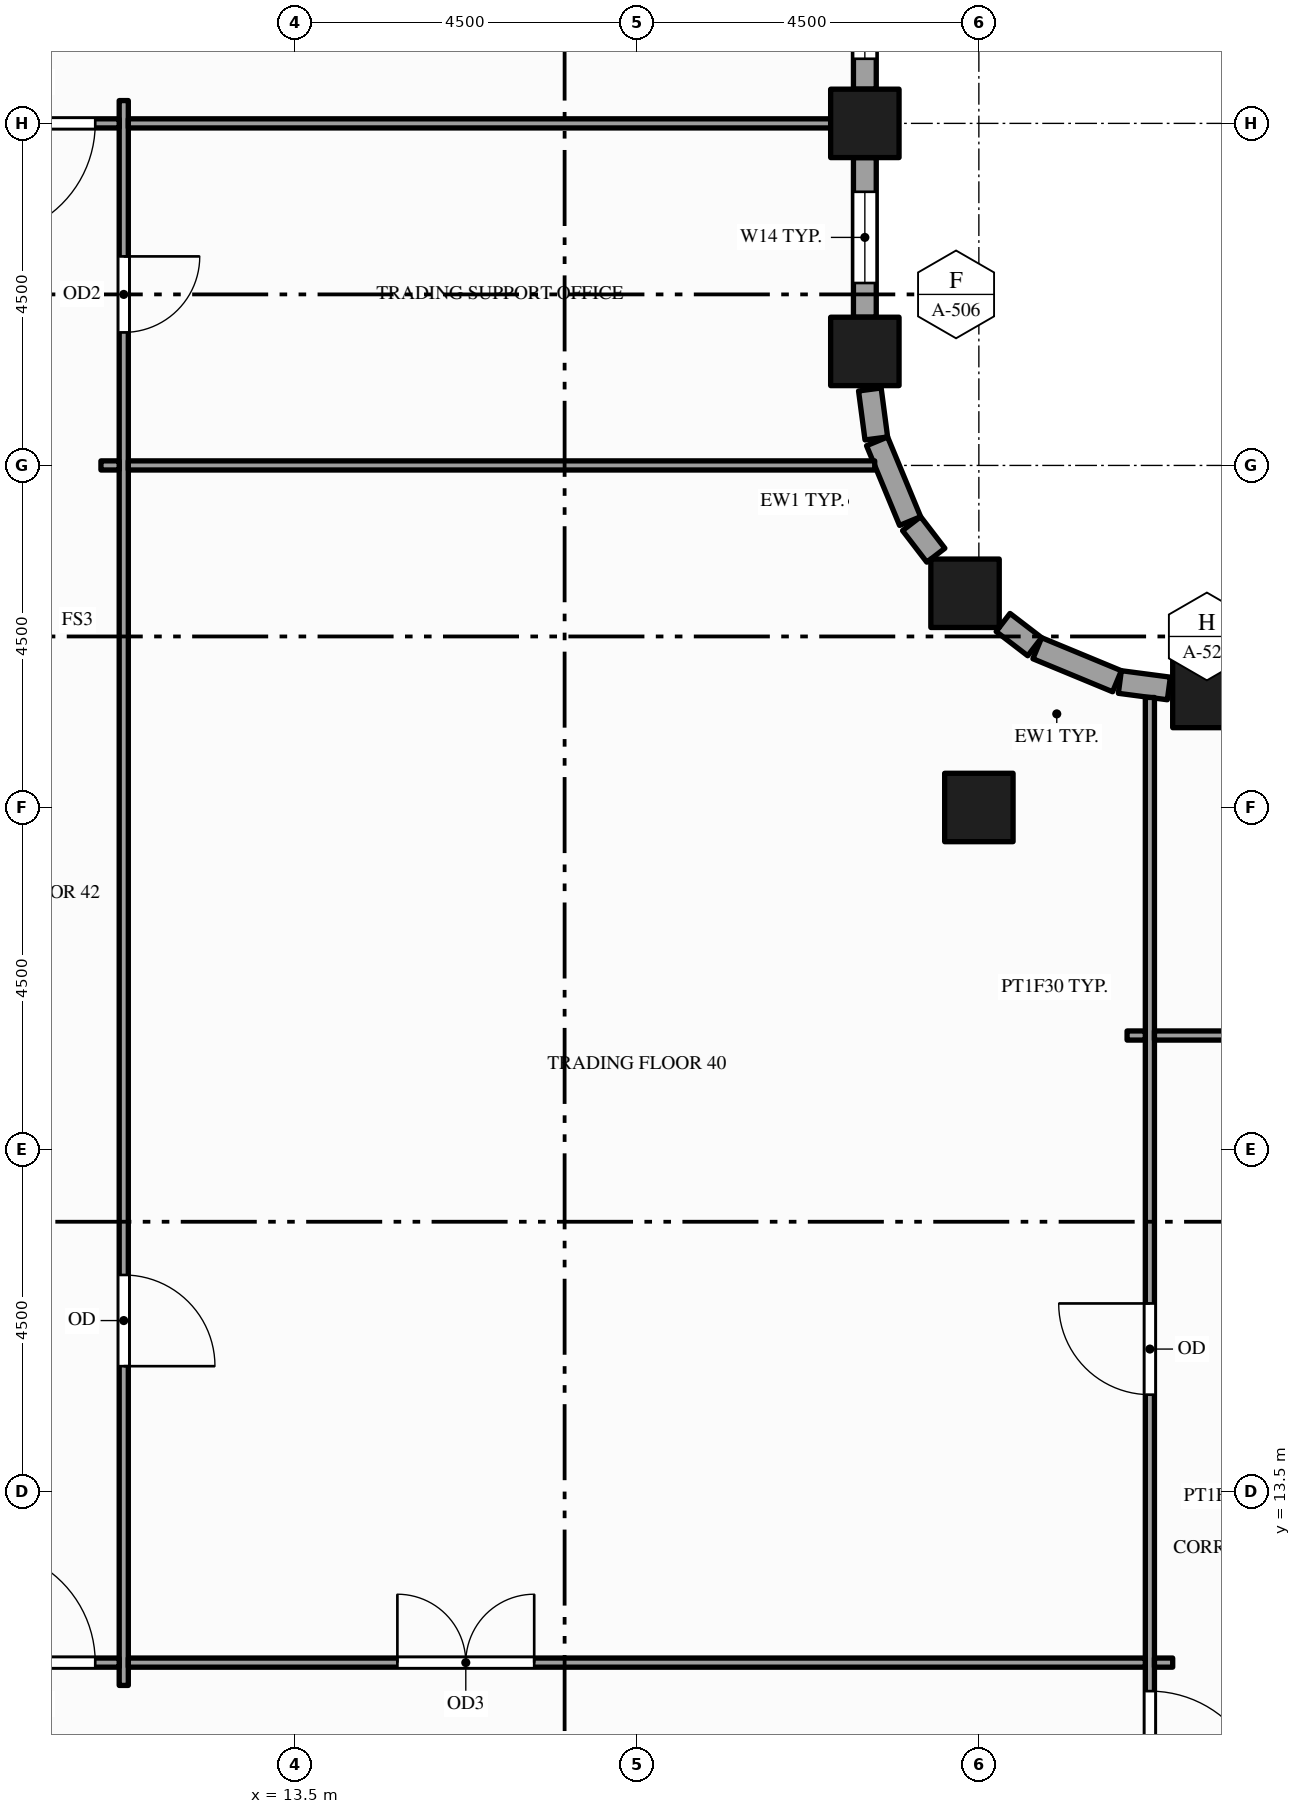
"""IFC4 building model, lengths in metres.
Left out: names, types, materials, properties, quantities, classifications, styles, units other than length and angle.
Written with IfcOpenShell. Run it as: python <this file> out.ifc"""

import sys

from ifc_helpers import new_model, si_unit, direction, frame, frame_2d, origin, origin_2d, place, context, subcontext, project, spatial, rectangle, hollow_rectangle, extrude, element, fill, save


model = new_model("IFC4")
c1 = context("Model", 3, precision=1e-05, world=origin(), true_north=direction((0.0, 1.0)))
c2 = subcontext(c1, "Body", "Model", "MODEL_VIEW")
j1 = project(units=[si_unit("LENGTHUNIT", "METRE"), si_unit("PLANEANGLEUNIT", "RADIAN")], contexts=[c1])
p1 = place(None, origin())
s1 = spatial("IfcSite", under=j1, at=p1, CompositionType="ELEMENT")
p2 = place(p1, origin())
s2 = spatial("IfcBuilding", under=s1, at=p2, CompositionType="ELEMENT")
p3 = place(p2, frame((0.0, 0.0, 159.0)))
s3 = spatial("IfcBuildingStorey", under=s2, at=p3, CompositionType="ELEMENT", Elevation=159.0)
for number, where, z_axis, x_axis in (
    (1, (21.0, 28.5, -0.15), (0.0, 0.0, 1.0), (1.0, 0.0, 0.0)),
    (2, (21.0, 31.5, -0.15), (0.0, 0.0, 1.0), (1.0, 0.0, 0.0)),
    (3, (22.318, 25.318, -0.15), (0.0, 0.0, 1.0), (1.0, 0.0, 0.0)),
    (4, (22.5, 22.5, -0.15), (0.0, 0.0, 1.0), (1.0, 0.0, 0.0)),
    (5, (25.5, 24.0, -0.15), (0.0, 0.0, 1.0), (1.0, 0.0, 0.0)),
):
    element("IfcColumn", number, at=place(p3, frame(where, z_axis=z_axis, x_axis=x_axis)), inside=s3, PredefinedType="COLUMN", context=c2, shape_type="SweptSolid", body=[
        extrude(hollow_rectangle(XDim=0.9, YDim=0.9, WallThickness=0.045, at=origin_2d()), origin(), (0.0, 0.0, 1.0), 4.0),
    ])
p4 = place(p3, frame((25.0, 24.066, 0.0), z_axis=(0.0, 0.0, 1.0), x_axis=(-0.991423590996, 0.130687655177, 0.0)))
e6 = element("IfcWall", 6, at=p4, inside=s3, PredefinedType="STANDARD", context=c2, shape_type="SweptSolid", body=[
    extrude(rectangle(XDim=0.65, YDim=0.3, at=frame_2d((0.325, 0.0))), origin(), (0.0, 0.0, 1.0), 2.87),
])
p5 = place(p3, frame((24.317, 24.161, 0.0), z_axis=(0.0, 0.0, 1.0), x_axis=(-0.923914616768, 0.382598720491, 0.0)))
e7 = element("IfcWall", 7, at=p5, inside=s3, PredefinedType="STANDARD", context=c2, shape_type="SweptSolid", body=[
    extrude(rectangle(XDim=1.135, YDim=0.3, at=frame_2d((0.568, 0.0))), origin(), (0.0, 0.0, 1.0), 3.149),
])
for number, where, z_axis, x_axis in (
    (8, (23.234, 24.615, 0.0), (0.0, 0.0, 1.0), (-0.794, 0.609, 0.0)),
    (9, (21.934, 25.819, 0.0), (0.0, 0.0, 1.0), (-0.609, 0.794, 0.0)),
):
    element("IfcWall", number, at=place(p3, frame(where, z_axis=z_axis, x_axis=x_axis)), inside=s3, PredefinedType="STANDARD", context=c2, shape_type="SweptSolid", body=[
        extrude(rectangle(XDim=0.524, YDim=0.3, at=frame_2d((0.262, 0.0))), origin(), (0.0, 0.0, 1.0), 3.149),
    ])
p6 = place(p3, frame((21.595, 26.268, 0.0), z_axis=(0.0, 0.0, 1.0), x_axis=(-0.382598720491, 0.923914616768, 0.0)))
e10 = element("IfcWall", 10, at=p6, inside=s3, PredefinedType="STANDARD", context=c2, shape_type="SweptSolid", body=[
    extrude(rectangle(XDim=1.135, YDim=0.3, at=frame_2d((0.568, 0.0))), origin(), (0.0, 0.0, 1.0), 3.149),
])
p7 = place(p3, frame((21.151, 27.355, 0.0), z_axis=(0.0, 0.0, 1.0), x_axis=(-0.130687655177, 0.991423590996, 0.0)))
e11 = element("IfcWall", 11, at=p7, inside=s3, PredefinedType="STANDARD", context=c2, shape_type="SweptSolid", body=[
    extrude(rectangle(XDim=0.65, YDim=0.3, at=frame_2d((0.325, 0.0))), origin(), (0.0, 0.0, 1.0), 3.149),
])
p8 = place(p3, frame((21.0, 28.95, 0.0), z_axis=(0.0, 0.0, 1.0), x_axis=(0.0, 1.0, 0.0)))
e12 = element("IfcWall", 12, at=p8, inside=s3, PredefinedType="STANDARD", context=c2, shape_type="SweptSolid", body=[
    extrude(rectangle(XDim=2.1, YDim=0.3, at=frame_2d((1.05, 0.0))), origin(), (0.0, 0.0, 1.0), 3.149),
])
p9 = place(p8, frame((0.45, 0.0, 0.9)))
e13 = element("IfcOpeningElement", 13, at=p9, cuts=e12, PredefinedType="OPENING", context=c2, shape_type="SweptSolid", body=[
    extrude(rectangle(XDim=1.2, YDim=2.0, at=frame_2d((0.6, 1.0))), frame((0.0, 0.16, 0.0), z_axis=(0.0, -1.0, 0.0), x_axis=(1.0, 0.0, 0.0)), (0.0, 0.0, 1.0), 0.32),
])
p10 = place(p3, frame((21.0, 31.95, 0.0), z_axis=(0.0, 0.0, 1.0), x_axis=(0.0, 1.0, 0.0)))
e14 = element("IfcWall", 14, at=p10, inside=s3, PredefinedType="STANDARD", context=c2, shape_type="SweptSolid", body=[
    extrude(rectangle(XDim=4.05, YDim=0.3, at=frame_2d((2.025, 0.0))), origin(), (0.0, 0.0, 1.0), 3.149),
])
p11 = place(p10, frame((0.4, 0.0, 0.9)))
e15 = element("IfcOpeningElement", 15, at=p11, cuts=e14, PredefinedType="OPENING", context=c2, shape_type="SweptSolid", body=[
    extrude(rectangle(XDim=1.1, YDim=2.0, at=frame_2d((0.55, 1.0))), frame((0.0, 0.16, 0.0), z_axis=(0.0, -1.0, 0.0), x_axis=(1.0, 0.0, 0.0)), (0.0, 0.0, 1.0), 0.32),
])
p12 = place(p10, frame((2.1, 0.0, 0.9)))
e16 = element("IfcOpeningElement", 16, at=p12, cuts=e14, PredefinedType="OPENING", context=c2, shape_type="SweptSolid", body=[
    extrude(rectangle(XDim=1.55, YDim=2.0, at=frame_2d((0.775, 1.0))), frame((0.0, 0.16, 0.0), z_axis=(0.0, -1.0, 0.0), x_axis=(1.0, 0.0, 0.0)), (0.0, 0.0, 1.0), 0.32),
])
p13 = place(p3, frame((11.25, 10.95, 0.0), z_axis=(0.0, 0.0, 1.0), x_axis=(0.0, 1.0, 0.0)))
e17 = element("IfcWall", 17, at=p13, inside=s3, PredefinedType="PARTITIONING", context=c2, shape_type="SweptSolid", body=[
    extrude(rectangle(XDim=20.85, YDim=0.12, at=frame_2d((10.425, 0.0))), origin(), (0.0, 0.0, 1.0), 2.6),
])
p14 = place(p13, frame((17.8, 0.0, 0.0)))
e18 = element("IfcOpeningElement", 18, at=p14, cuts=e17, PredefinedType="OPENING", context=c2, shape_type="SweptSolid", body=[
    extrude(rectangle(XDim=1.0, YDim=2.1, at=frame_2d((0.5, 1.05))), frame((0.0, 0.07, 0.0), z_axis=(0.0, -1.0, 0.0), x_axis=(1.0, 0.0, 0.0)), (0.0, 0.0, 1.0), 0.14),
])
p15 = place(p13, frame((4.2, 0.0, 0.0)))
e19 = element("IfcOpeningElement", 19, at=p15, cuts=e17, PredefinedType="OPENING", context=c2, shape_type="SweptSolid", body=[
    extrude(rectangle(XDim=1.2, YDim=2.1, at=frame_2d((0.6, 1.05))), frame((0.0, 0.07, 0.0), z_axis=(0.0, -1.0, 0.0), x_axis=(1.0, 0.0, 0.0)), (0.0, 0.0, 1.0), 0.14),
])
p16 = place(p3, frame((24.75, 1.65, 0.0), z_axis=(0.0, 0.0, 1.0), x_axis=(0.0, 1.0, 0.0)))
e20 = element("IfcWall", 20, at=p16, inside=s3, PredefinedType="PARTITIONING", context=c2, shape_type="SweptSolid", body=[
    extrude(rectangle(XDim=22.298, YDim=0.12, at=frame_2d((11.149, 0.0))), origin(), (0.0, 0.0, 1.0), 2.87),
])
p17 = place(p16, frame((7.725, 0.0, 0.0)))
e21 = element("IfcOpeningElement", 21, at=p17, cuts=e20, PredefinedType="OPENING", context=c2, shape_type="SweptSolid", body=[
    extrude(rectangle(XDim=1.5, YDim=2.1, at=frame_2d((0.75, 1.05))), frame((0.0, 0.07, 0.0), z_axis=(0.0, -1.0, 0.0), x_axis=(1.0, 0.0, 0.0)), (0.0, 0.0, 1.0), 0.14),
])
p18 = place(p16, frame((13.125, 0.0, 0.0)))
e22 = element("IfcOpeningElement", 22, at=p18, cuts=e20, PredefinedType="OPENING", context=c2, shape_type="SweptSolid", body=[
    extrude(rectangle(XDim=1.2, YDim=2.1, at=frame_2d((0.6, 1.05))), frame((0.0, 0.07, 0.0), z_axis=(0.0, -1.0, 0.0), x_axis=(1.0, 0.0, 0.0)), (0.0, 0.0, 1.0), 0.14),
])
p19 = place(p3, frame((9.06, 11.25, 0.0), z_axis=(0.0, 0.0, 1.0), x_axis=(1.0, 0.0, 0.0)))
e23 = element("IfcWall", 23, at=p19, inside=s3, PredefinedType="PARTITIONING", context=c2, shape_type="SweptSolid", body=[
    extrude(rectangle(XDim=2.13, YDim=0.12, at=frame_2d((1.065, 0.0))), origin(), (0.0, 0.0, 1.0), 2.87),
])
p20 = place(p19, frame((0.315, 0.0, 0.0)))
e24 = element("IfcOpeningElement", 24, at=p20, cuts=e23, PredefinedType="OPENING", context=c2, shape_type="SweptSolid", body=[
    extrude(rectangle(XDim=1.5, YDim=2.1, at=frame_2d((0.75, 1.05))), frame((0.0, 0.07, 0.0), z_axis=(0.0, -1.0, 0.0), x_axis=(1.0, 0.0, 0.0)), (0.0, 0.0, 1.0), 0.14),
])
p21 = place(p3, frame((11.31, 11.25, 0.0), z_axis=(0.0, 0.0, 1.0), x_axis=(1.0, 0.0, 0.0)))
e25 = element("IfcWall", 25, at=p21, inside=s3, PredefinedType="PARTITIONING", context=c2, shape_type="SweptSolid", body=[
    extrude(rectangle(XDim=13.38, YDim=0.12, at=frame_2d((6.69, 0.0))), origin(), (0.0, 0.0, 1.0), 2.87),
])
p22 = place(p21, frame((3.54, 0.0, 0.0)))
e26 = element("IfcOpeningElement", 26, at=p22, cuts=e25, PredefinedType="OPENING", context=c2, shape_type="SweptSolid", body=[
    extrude(rectangle(XDim=1.8, YDim=2.1, at=frame_2d((0.9, 1.05))), frame((0.0, 0.07, 0.0), z_axis=(0.0, -1.0, 0.0), x_axis=(1.0, 0.0, 0.0)), (0.0, 0.0, 1.0), 0.14),
])
for number, where, z_axis, x_axis in (
    (27, (24.81, 11.25, 0.0), (0.0, 0.0, 1.0), (1.0, 0.0, 0.0)),
    (28, (24.45, 19.5, 0.0), (0.0, 0.0, 1.0), (1.0, 0.0, 0.0)),
):
    element("IfcWall", number, at=place(p3, frame(where, z_axis=z_axis, x_axis=x_axis)), inside=s3, PredefinedType="PARTITIONING", context=c2, shape_type="SweptSolid", body=[
        extrude(rectangle(XDim=0.24, YDim=0.12, at=frame_2d((0.12, 0.0))), origin(), (0.0, 0.0, 1.0), 2.87),
    ])
p23 = place(p3, frame((24.81, 19.5, 0.0), z_axis=(0.0, 0.0, 1.0), x_axis=(1.0, 0.0, 0.0)))
e29 = element("IfcWall", 29, at=p23, inside=s3, PredefinedType="PARTITIONING", context=c2, shape_type="SweptSolid", body=[
    extrude(rectangle(XDim=2.13, YDim=0.12, at=frame_2d((1.065, 0.0))), origin(), (0.0, 0.0, 1.0), 2.87),
])
p24 = place(p3, frame((10.95, 27.0, 0.0), z_axis=(0.0, 0.0, 1.0), x_axis=(1.0, 0.0, 0.0)))
e30 = element("IfcWall", 30, at=p24, inside=s3, PredefinedType="PARTITIONING", context=c2, shape_type="SweptSolid", body=[
    extrude(rectangle(XDim=0.24, YDim=0.12, at=frame_2d((0.12, 0.0))), origin(), (0.0, 0.0, 1.0), 2.87),
])
p25 = place(p3, frame((11.31, 27.0, 0.0), z_axis=(0.0, 0.0, 1.0), x_axis=(1.0, 0.0, 0.0)))
e31 = element("IfcWall", 31, at=p25, inside=s3, PredefinedType="PARTITIONING", context=c2, shape_type="SweptSolid", body=[
    extrude(rectangle(XDim=9.82, YDim=0.12, at=frame_2d((4.91, 0.0))), origin(), (0.0, 0.0, 1.0), 2.87),
])
p26 = place(p3, frame((9.06, 31.5, 0.0), z_axis=(0.0, 0.0, 1.0), x_axis=(1.0, 0.0, 0.0)))
e32 = element("IfcWall", 32, at=p26, inside=s3, PredefinedType="PARTITIONING", context=c2, shape_type="SweptSolid", body=[
    extrude(rectangle(XDim=2.13, YDim=0.12, at=frame_2d((1.065, 0.0))), origin(), (0.0, 0.0, 1.0), 2.87),
])
p27 = place(p26, frame((0.315, 0.0, 0.0)))
e33 = element("IfcOpeningElement", 33, at=p27, cuts=e32, PredefinedType="OPENING", context=c2, shape_type="SweptSolid", body=[
    extrude(rectangle(XDim=1.5, YDim=2.1, at=frame_2d((0.75, 1.05))), frame((0.0, 0.07, 0.0), z_axis=(0.0, -1.0, 0.0), x_axis=(1.0, 0.0, 0.0)), (0.0, 0.0, 1.0), 0.14),
])
p28 = place(p3, frame((11.31, 31.5, 0.0), z_axis=(0.0, 0.0, 1.0), x_axis=(1.0, 0.0, 0.0)))
e34 = element("IfcWall", 34, at=p28, inside=s3, PredefinedType="PARTITIONING", context=c2, shape_type="SweptSolid", body=[
    extrude(rectangle(XDim=9.54, YDim=0.12, at=frame_2d((4.77, 0.0))), origin(), (0.0, 0.0, 1.0), 2.87),
])
p29 = place(p9, origin())
e35 = element("IfcWindow", 35, at=p29, inside=s3, PartitioningType="SINGLE_PANEL", PredefinedType="WINDOW", context=c2, shape_type="SweptSolid", body=[
    extrude(rectangle(XDim=1.2, YDim=2.0, at=frame_2d((0.6, 1.0))), frame((0.0, 0.03, 0.0), z_axis=(0.0, -1.0, 0.0), x_axis=(1.0, 0.0, 0.0)), (0.0, 0.0, 1.0), 0.06),
])
fill(e13, e35)
p30 = place(p11, origin())
e36 = element("IfcWindow", 36, at=p30, inside=s3, PartitioningType="SINGLE_PANEL", PredefinedType="WINDOW", context=c2, shape_type="SweptSolid", body=[
    extrude(rectangle(XDim=1.1, YDim=2.0, at=frame_2d((0.55, 1.0))), frame((0.0, 0.03, 0.0), z_axis=(0.0, -1.0, 0.0), x_axis=(1.0, 0.0, 0.0)), (0.0, 0.0, 1.0), 0.06),
])
fill(e15, e36)
p31 = place(p17, origin())
e37 = element("IfcDoor", 37, at=p31, inside=s3, OperationType="SINGLE_SWING_LEFT", PredefinedType="DOOR", context=c2, shape_type="SweptSolid", body=[
    extrude(rectangle(XDim=1.5, YDim=2.1, at=frame_2d((0.75, 1.05))), frame((0.0, 0.025, 0.0), z_axis=(0.0, -1.0, 0.0), x_axis=(1.0, 0.0, 0.0)), (0.0, 0.0, 1.0), 0.05),
])
fill(e21, e37)
p32 = place(p22, origin())
e38 = element("IfcDoor", 38, at=p32, inside=s3, OperationType="DOUBLE_DOOR_SINGLE_SWING", PredefinedType="DOOR", context=c2, shape_type="SweptSolid", body=[
    extrude(rectangle(XDim=1.8, YDim=2.1, at=frame_2d((0.9, 1.05))), frame((0.0, 0.025, 0.0), z_axis=(0.0, -1.0, 0.0), x_axis=(1.0, 0.0, 0.0)), (0.0, 0.0, 1.0), 0.05),
])
fill(e26, e38)
p33 = place(p20, origin())
e39 = element("IfcDoor", 39, at=p33, inside=s3, OperationType="SINGLE_SWING_LEFT", PredefinedType="DOOR", context=c2, shape_type="SweptSolid", body=[
    extrude(rectangle(XDim=1.5, YDim=2.1, at=frame_2d((0.75, 1.05))), frame((0.0, 0.025, 0.0), z_axis=(0.0, -1.0, 0.0), x_axis=(1.0, 0.0, 0.0)), (0.0, 0.0, 1.0), 0.05),
])
fill(e24, e39)
p34 = place(p27, origin())
e40 = element("IfcDoor", 40, at=p34, inside=s3, OperationType="SINGLE_SWING_LEFT", PredefinedType="DOOR", context=c2, shape_type="SweptSolid", body=[
    extrude(rectangle(XDim=1.5, YDim=2.1, at=frame_2d((0.75, 1.05))), frame((0.0, 0.025, 0.0), z_axis=(0.0, -1.0, 0.0), x_axis=(1.0, 0.0, 0.0)), (0.0, 0.0, 1.0), 0.05),
])
fill(e33, e40)
p35 = place(p14, origin())
e41 = element("IfcDoor", 41, at=p35, inside=s3, OperationType="SINGLE_SWING_RIGHT", PredefinedType="DOOR", context=c2, shape_type="SweptSolid", body=[
    extrude(rectangle(XDim=1.0, YDim=2.1, at=frame_2d((0.5, 1.05))), frame((0.0, 0.025, 0.0), z_axis=(0.0, -1.0, 0.0), x_axis=(1.0, 0.0, 0.0)), (0.0, 0.0, 1.0), 0.05),
])
fill(e18, e41)
p36 = place(p15, origin())
e42 = element("IfcDoor", 42, at=p36, inside=s3, OperationType="SINGLE_SWING_LEFT", PredefinedType="DOOR", context=c2, shape_type="SweptSolid", body=[
    extrude(rectangle(XDim=1.2, YDim=2.1, at=frame_2d((0.6, 1.05))), frame((0.0, 0.025, 0.0), z_axis=(0.0, -1.0, 0.0), x_axis=(1.0, 0.0, 0.0)), (0.0, 0.0, 1.0), 0.05),
])
fill(e19, e42)
p37 = place(p18, origin())
e43 = element("IfcDoor", 43, at=p37, inside=s3, OperationType="SINGLE_SWING_RIGHT", PredefinedType="DOOR", context=c2, shape_type="SweptSolid", body=[
    extrude(rectangle(XDim=1.2, YDim=2.1, at=frame_2d((0.6, 1.05))), frame((0.0, 0.025, 0.0), z_axis=(0.0, -1.0, 0.0), x_axis=(1.0, 0.0, 0.0)), (0.0, 0.0, 1.0), 0.05),
])
fill(e22, e43)
save(model, sys.argv[1])
